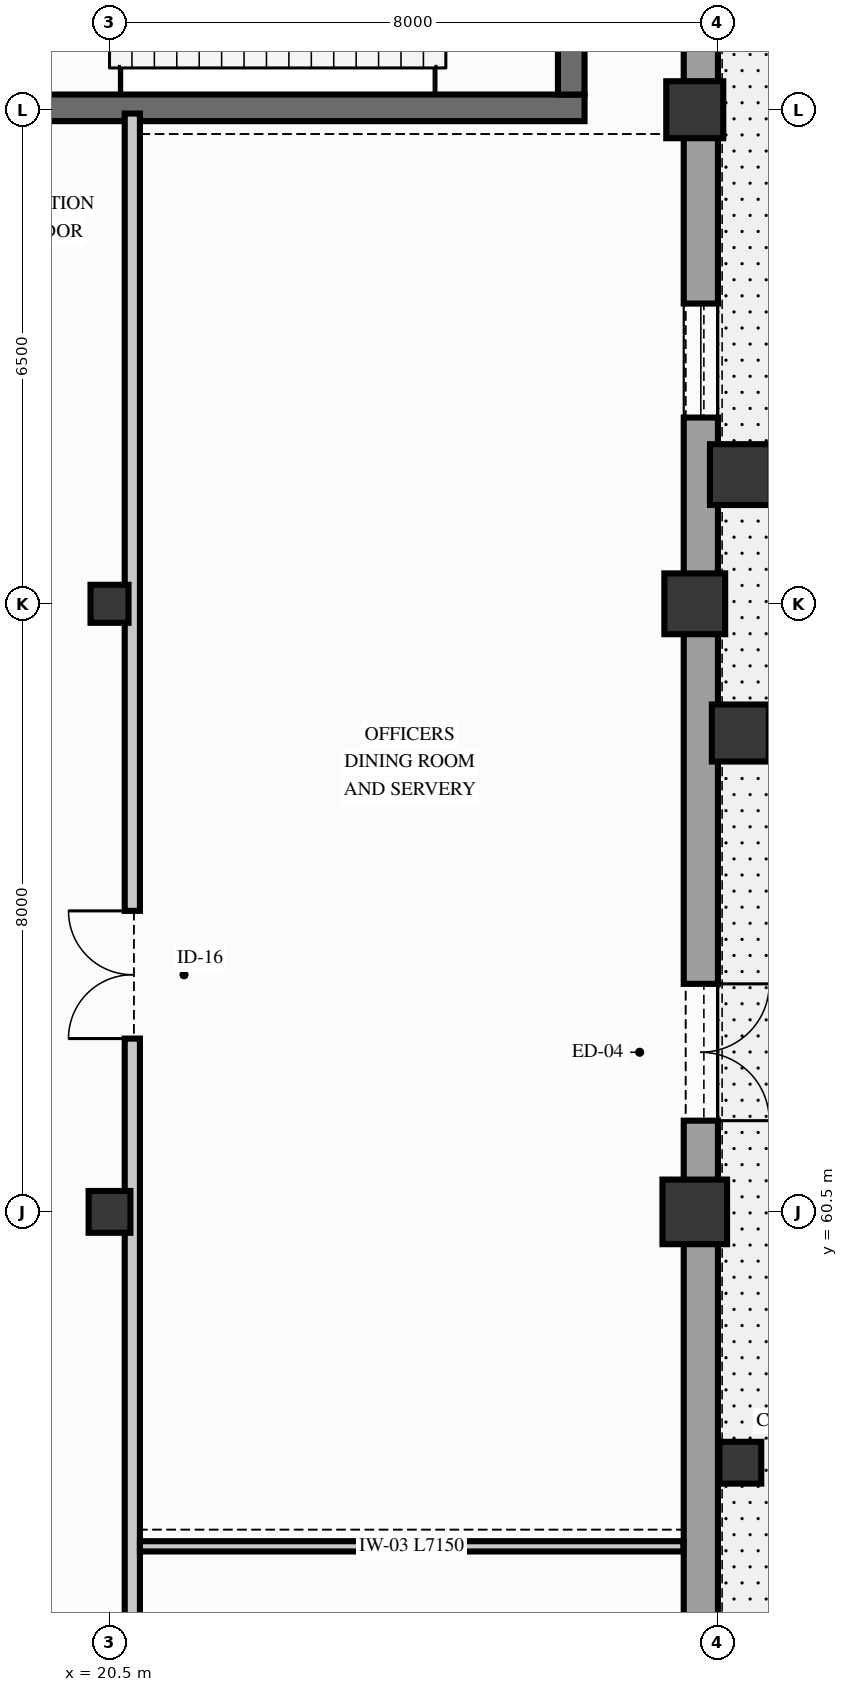
"""IFC4 building model, lengths in metres.
Left out: names, types, materials, properties, quantities, classifications, styles, units other than length and angle.
Written with IfcOpenShell. Run it as: python <this file> out.ifc"""

import sys

from ifc_helpers import new_model, si_unit, direction, frame, frame_2d, origin, origin_2d, place, context, subcontext, project, spatial, rectangle, extrude, element, fill, save


model = new_model("IFC4")
c1 = context("Model", 3, precision=1e-05, world=origin(), true_north=direction((0.0, 1.0)))
c2 = subcontext(c1, "Body", "Model", "MODEL_VIEW")
j1 = project(units=[si_unit("LENGTHUNIT", "METRE"), si_unit("PLANEANGLEUNIT", "RADIAN")], contexts=[c1])
p1 = place(None, origin())
s1 = spatial("IfcSite", under=j1, at=p1, CompositionType="ELEMENT")
p2 = place(p1, origin())
s2 = spatial("IfcBuilding", under=s1, at=p2, CompositionType="ELEMENT")
p3 = place(p2, origin())
s3 = spatial("IfcBuildingStorey", under=s2, at=p3, CompositionType="ELEMENT", Elevation=0.0)
p4 = place(p3, frame((18.45, 75.025, 0.0), z_axis=(0.0, 0.0, 1.0), x_axis=(1.0, 0.0, 0.0)))
e1 = element("IfcWall", 1, at=p4, inside=s3, PredefinedType="SHEAR", context=c2, shape_type="SweptSolid", body=[
    extrude(rectangle(XDim=8.3, YDim=0.35, at=frame_2d((4.15, 0.0))), origin(), (0.0, 0.0, 1.0), 4.88),
])
p5 = place(p3, frame((26.575, 75.2, 0.0), z_axis=(0.0, 0.0, 1.0), x_axis=(0.0, 1.0, 0.0)))
e2 = element("IfcWall", 2, at=p5, inside=s3, PredefinedType="SHEAR", context=c2, shape_type="SweptSolid", body=[
    extrude(rectangle(XDim=6.8, YDim=0.35, at=frame_2d((3.4, 0.0))), origin(), (0.0, 0.0, 1.0), 4.88),
])
p6 = place(p3, frame((28.8, 57.2, 0.0), z_axis=(0.0, 0.0, 1.0), x_axis=(1.0, 0.0, 0.0)))
e3 = element("IfcColumn", 3, at=p6, inside=s3, PredefinedType="COLUMN", context=c2, shape_type="SweptSolid", body=[
    extrude(rectangle(XDim=0.55, YDim=0.55, at=origin_2d()), origin(), (0.0, 0.0, 1.0), 5.1),
])
p7 = place(p3, frame((28.8, 70.2, 0.0), z_axis=(0.0, 0.0, 1.0), x_axis=(1.0, 0.0, 0.0)))
e4 = element("IfcColumn", 4, at=p7, inside=s3, PredefinedType="COLUMN", context=c2, shape_type="SweptSolid", body=[
    extrude(rectangle(XDim=0.8, YDim=0.8, at=origin_2d()), origin(), (0.0, 0.0, 1.0), 5.1),
])
p8 = place(p3, frame((28.8, 66.8, 0.0), z_axis=(0.0, 0.0, 1.0), x_axis=(1.0, 0.0, 0.0)))
e5 = element("IfcColumn", 5, at=p8, inside=s3, PredefinedType="COLUMN", context=c2, shape_type="SweptSolid", body=[
    extrude(rectangle(XDim=0.75, YDim=0.75, at=origin_2d()), origin(), (0.0, 0.0, 1.0), 5.1),
])
p9 = place(p3, frame((20.5, 60.5, 0.0), z_axis=(0.0, 0.0, 1.0), x_axis=(1.0, 0.0, 0.0)))
e6 = element("IfcColumn", 6, at=p9, inside=s3, PredefinedType="COLUMN", context=c2, shape_type="SweptSolid", body=[
    extrude(rectangle(XDim=0.55, YDim=0.55, at=origin_2d()), origin(), (0.0, 0.0, 1.0), 5.1),
])
p10 = place(p3, frame((20.5, 68.5, 0.0), z_axis=(0.0, 0.0, 1.0), x_axis=(1.0, 0.0, 0.0)))
e7 = element("IfcColumn", 7, at=p10, inside=s3, PredefinedType="COLUMN", context=c2, shape_type="SweptSolid", body=[
    extrude(rectangle(XDim=0.5, YDim=0.5, at=origin_2d()), origin(), (0.0, 0.0, 1.0), 5.1),
])
p11 = place(p3, frame((28.2, 60.5, 0.0), z_axis=(0.0, 0.0, 1.0), x_axis=(1.0, 0.0, 0.0)))
e8 = element("IfcColumn", 8, at=p11, inside=s3, PredefinedType="COLUMN", context=c2, shape_type="SweptSolid", body=[
    extrude(rectangle(XDim=0.85, YDim=0.85, at=origin_2d()), origin(), (0.0, 0.0, 1.0), 5.1),
])
p12 = place(p3, frame((28.2, 68.5, 0.0), z_axis=(0.0, 0.0, 1.0), x_axis=(1.0, 0.0, 0.0)))
e9 = element("IfcColumn", 9, at=p12, inside=s3, PredefinedType="COLUMN", context=c2, shape_type="SweptSolid", body=[
    extrude(rectangle(XDim=0.8, YDim=0.8, at=origin_2d()), origin(), (0.0, 0.0, 1.0), 5.1),
])
p13 = place(p3, frame((28.2, 75.0, 0.0), z_axis=(0.0, 0.0, 1.0), x_axis=(1.0, 0.0, 0.0)))
e10 = element("IfcColumn", 10, at=p13, inside=s3, PredefinedType="COLUMN", context=c2, shape_type="SweptSolid", body=[
    extrude(rectangle(XDim=0.75, YDim=0.75, at=origin_2d()), origin(), (0.0, 0.0, 1.0), 5.1),
])
p14 = place(p3, frame((28.28, 36.5, 0.0), z_axis=(0.0, 0.0, 1.0), x_axis=(0.0, 1.0, 0.0)))
e11 = element("IfcWall", 11, at=p14, inside=s3, PredefinedType="SOLIDWALL", context=c2, shape_type="SweptSolid", body=[
    extrude(rectangle(XDim=47.0, YDim=0.45, at=frame_2d((23.5, 0.0))), origin(), (0.0, 0.0, 1.0), 4.52),
])
p15 = place(p14, frame((27.0, 0.0, 0.0), z_axis=(0.0, 0.0, 1.0), x_axis=(-1.0, 0.0, 0.0)))
e12 = element("IfcOpeningElement", 12, at=p15, cuts=e11, PredefinedType="OPENING", context=c2, shape_type="SweptSolid", body=[
    extrude(rectangle(XDim=1.8, YDim=2.4, at=frame_2d((0.9, 1.2))), frame((0.0, 0.235, 0.0), z_axis=(0.0, -1.0, 0.0), x_axis=(1.0, 0.0, 0.0)), (0.0, 0.0, 1.0), 0.47),
])
p16 = place(p14, frame((1.65, 0.0, 0.85)))
e13 = element("IfcOpeningElement", 13, at=p16, cuts=e11, PredefinedType="OPENING", context=c2, shape_type="SweptSolid", body=[
    extrude(rectangle(XDim=1.6, YDim=2.4, at=frame_2d((0.8, 1.2))), frame((0.0, 0.235, 0.0), z_axis=(0.0, -1.0, 0.0), x_axis=(1.0, 0.0, 0.0)), (0.0, 0.0, 1.0), 0.47),
])
p17 = place(p14, frame((9.85, 0.0, 0.85)))
e14 = element("IfcOpeningElement", 14, at=p17, cuts=e11, PredefinedType="OPENING", context=c2, shape_type="SweptSolid", body=[
    extrude(rectangle(XDim=1.5, YDim=2.3, at=frame_2d((0.75, 1.15))), frame((0.0, 0.235, 0.0), z_axis=(0.0, -1.0, 0.0), x_axis=(1.0, 0.0, 0.0)), (0.0, 0.0, 1.0), 0.47),
])
p18 = place(p14, frame((34.45, 0.0, 0.85)))
e15 = element("IfcOpeningElement", 15, at=p18, cuts=e11, PredefinedType="OPENING", context=c2, shape_type="SweptSolid", body=[
    extrude(rectangle(XDim=1.5, YDim=2.3, at=frame_2d((0.75, 1.15))), frame((0.0, 0.235, 0.0), z_axis=(0.0, -1.0, 0.0), x_axis=(1.0, 0.0, 0.0)), (0.0, 0.0, 1.0), 0.47),
])
p19 = place(p14, frame((42.65, 0.0, 0.85)))
e16 = element("IfcOpeningElement", 16, at=p19, cuts=e11, PredefinedType="OPENING", context=c2, shape_type="SweptSolid", body=[
    extrude(rectangle(XDim=2.2, YDim=2.6, at=frame_2d((1.1, 1.3))), frame((0.0, 0.235, 0.0), z_axis=(0.0, -1.0, 0.0), x_axis=(1.0, 0.0, 0.0)), (0.0, 0.0, 1.0), 0.47),
])
p20 = place(p3, frame((20.8, 6.78, 0.0), z_axis=(0.0, 0.0, 1.0), x_axis=(0.0, 1.0, 0.0)))
e17 = element("IfcWall", 17, at=p20, inside=s3, PredefinedType="PARTITIONING", context=c2, shape_type="SweptSolid", body=[
    extrude(rectangle(XDim=68.17, YDim=0.2, at=frame_2d((34.085, 0.0))), origin(), (0.0, 0.0, 1.0), 4.368),
])
p21 = place(p20, frame((3.1, 0.0, 0.0)))
e18 = element("IfcOpeningElement", 18, at=p21, cuts=e17, PredefinedType="OPENING", context=c2, shape_type="SweptSolid", body=[
    extrude(rectangle(XDim=1.25, YDim=2.2, at=frame_2d((0.625, 1.1))), frame((0.0, 0.11, 0.0), z_axis=(0.0, -1.0, 0.0), x_axis=(1.0, 0.0, 0.0)), (0.0, 0.0, 1.0), 0.22),
])
p22 = place(p20, frame((14.9, 0.0, 0.0)))
e19 = element("IfcOpeningElement", 19, at=p22, cuts=e17, PredefinedType="OPENING", context=c2, shape_type="SweptSolid", body=[
    extrude(rectangle(XDim=0.98, YDim=2.16, at=frame_2d((0.49, 1.08))), frame((0.0, 0.11, 0.0), z_axis=(0.0, -1.0, 0.0), x_axis=(1.0, 0.0, 0.0)), (0.0, 0.0, 1.0), 0.22),
])
p23 = place(p20, frame((24.0, 0.0, 0.0)))
e20 = element("IfcOpeningElement", 20, at=p23, cuts=e17, PredefinedType="OPENING", context=c2, shape_type="SweptSolid", body=[
    extrude(rectangle(XDim=0.95, YDim=2.15, at=frame_2d((0.475, 1.075))), frame((0.0, 0.11, 0.0), z_axis=(0.0, -1.0, 0.0), x_axis=(1.0, 0.0, 0.0)), (0.0, 0.0, 1.0), 0.22),
])
p24 = place(p20, frame((38.9, 0.0, 0.0)))
e21 = element("IfcOpeningElement", 21, at=p24, cuts=e17, PredefinedType="OPENING", context=c2, shape_type="SweptSolid", body=[
    extrude(rectangle(XDim=0.95, YDim=2.15, at=frame_2d((0.475, 1.075))), frame((0.0, 0.11, 0.0), z_axis=(0.0, -1.0, 0.0), x_axis=(1.0, 0.0, 0.0)), (0.0, 0.0, 1.0), 0.22),
])
p25 = place(p20, frame((56.0, 0.0, 0.0)))
e22 = element("IfcOpeningElement", 22, at=p25, cuts=e17, PredefinedType="OPENING", context=c2, shape_type="SweptSolid", body=[
    extrude(rectangle(XDim=1.68, YDim=2.34, at=frame_2d((0.84, 1.17))), frame((0.0, 0.11, 0.0), z_axis=(0.0, -1.0, 0.0), x_axis=(1.0, 0.0, 0.0)), (0.0, 0.0, 1.0), 0.22),
])
p26 = place(p3, frame((20.9, 56.1, 0.0), z_axis=(0.0, 0.0, 1.0), x_axis=(1.0, 0.0, 0.0)))
e23 = element("IfcWall", 23, at=p26, inside=s3, PredefinedType="PARTITIONING", context=c2, shape_type="SweptSolid", body=[
    extrude(rectangle(XDim=7.15, YDim=0.135, at=frame_2d((3.575, 0.0))), origin(), (0.0, 0.0, 1.0), 4.86),
])
p27 = place(p15, origin())
e24 = element("IfcDoor", 24, at=p27, inside=s3, OperationType="DOUBLE_DOOR_SINGLE_SWING", PredefinedType="DOOR", context=c2, shape_type="SweptSolid", body=[
    extrude(rectangle(XDim=1.8, YDim=2.4, at=frame_2d((0.9, 1.2))), frame((0.0, 0.025, 0.0), z_axis=(0.0, -1.0, 0.0), x_axis=(1.0, 0.0, 0.0)), (0.0, 0.0, 1.0), 0.05),
])
fill(e12, e24)
p28 = place(p18, origin())
e25 = element("IfcWindow", 25, at=p28, inside=s3, PartitioningType="SINGLE_PANEL", PredefinedType="WINDOW", context=c2, shape_type="SweptSolid", body=[
    extrude(rectangle(XDim=1.5, YDim=2.3, at=frame_2d((0.75, 1.15))), frame((0.0, 0.03, 0.0), z_axis=(0.0, -1.0, 0.0), x_axis=(1.0, 0.0, 0.0)), (0.0, 0.0, 1.0), 0.06),
])
fill(e15, e25)
p29 = place(p25, origin())
e26 = element("IfcDoor", 26, at=p29, inside=s3, OperationType="DOUBLE_DOOR_SINGLE_SWING", PredefinedType="DOOR", context=c2, shape_type="SweptSolid", body=[
    extrude(rectangle(XDim=1.68, YDim=2.34, at=frame_2d((0.84, 1.17))), frame((0.0, 0.025, 0.0), z_axis=(0.0, -1.0, 0.0), x_axis=(1.0, 0.0, 0.0)), (0.0, 0.0, 1.0), 0.05),
])
fill(e22, e26)
save(model, sys.argv[1])
